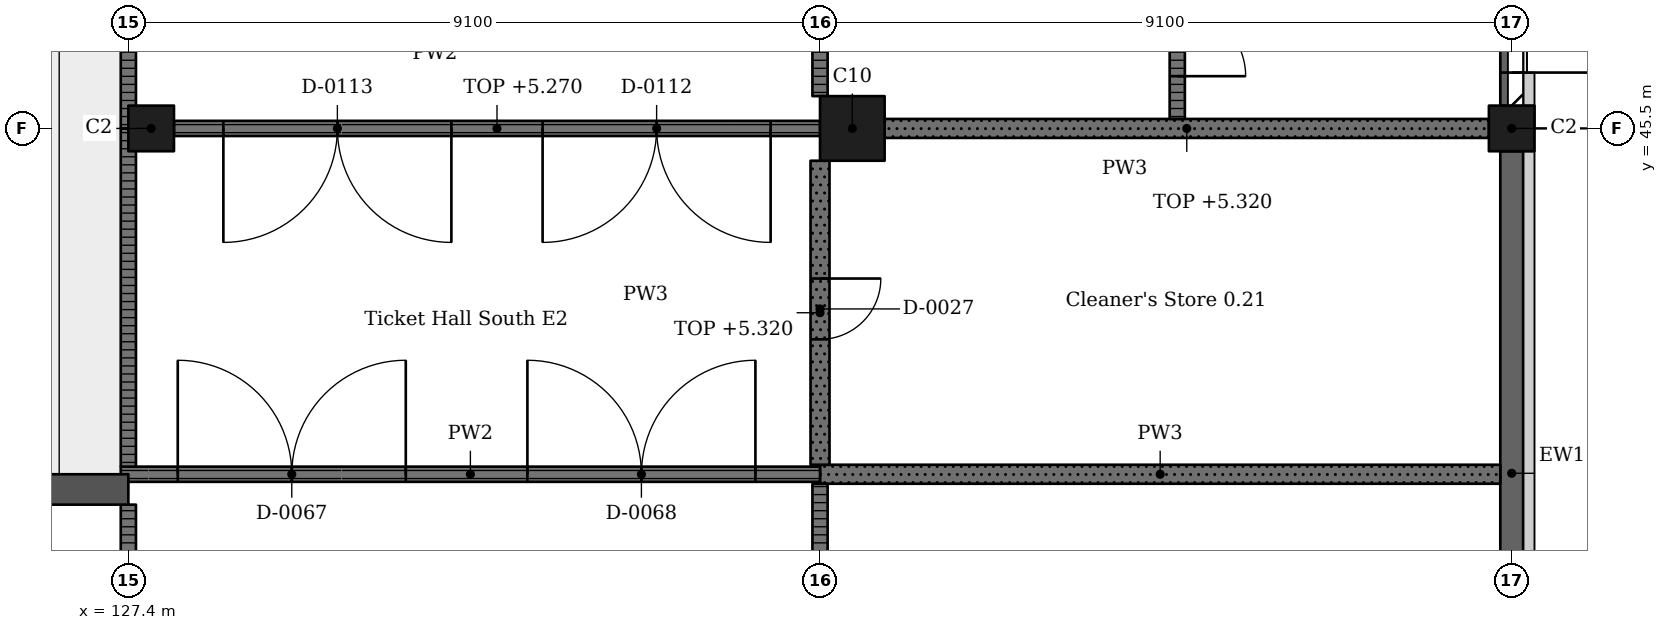
"""IFC4 building model, lengths in metres.
Left out: names, types, materials, properties, quantities, classifications, styles, units other than length and angle.
Written with IfcOpenShell. Run it as: python <this file> out.ifc"""

import sys

from ifc_helpers import new_model, si_unit, direction, frame, frame_2d, origin, origin_2d, place, context, subcontext, project, spatial, rectangle, extrude, element, fill, save


model = new_model("IFC4")
c1 = context("Model", 3, precision=1e-05, world=origin(), true_north=direction((0.0, 1.0)))
c2 = subcontext(c1, "Body", "Model", "MODEL_VIEW")
j1 = project(units=[si_unit("LENGTHUNIT", "METRE"), si_unit("PLANEANGLEUNIT", "RADIAN")], contexts=[c1])
p1 = place(None, origin())
s1 = spatial("IfcSite", under=j1, at=p1, CompositionType="ELEMENT")
p2 = place(p1, origin())
s2 = spatial("IfcBuilding", under=s1, at=p2, CompositionType="ELEMENT")
p3 = place(p2, origin())
s3 = spatial("IfcBuildingStorey", under=s2, at=p3, CompositionType="ELEMENT", Elevation=0.0)
p4 = place(p3, frame((127.7, 45.5, -0.4), z_axis=(0.0, 0.0, 1.0), x_axis=(1.0, 0.0, 0.0)))
e1 = element("IfcColumn", 1, at=p4, inside=s3, PredefinedType="COLUMN", context=c2, shape_type="SweptSolid", body=[
    extrude(rectangle(XDim=0.6, YDim=0.6, at=origin_2d()), origin(), (0.0, 0.0, 1.0), 6.77),
])
p5 = place(p3, frame((136.925, 45.5, -0.4), z_axis=(0.0, 0.0, 1.0), x_axis=(1.0, 0.0, 0.0)))
e2 = element("IfcColumn", 2, at=p5, inside=s3, PredefinedType="COLUMN", context=c2, shape_type="SweptSolid", body=[
    extrude(rectangle(XDim=0.85, YDim=0.85, at=origin_2d()), origin(), (0.0, 0.0, 1.0), 6.77),
])
p6 = place(p3, frame((145.6, 45.5, -0.4), z_axis=(0.0, 0.0, 1.0), x_axis=(1.0, 0.0, 0.0)))
e3 = element("IfcColumn", 3, at=p6, inside=s3, PredefinedType="COLUMN", context=c2, shape_type="SweptSolid", body=[
    extrude(rectangle(XDim=0.6, YDim=0.6, at=origin_2d()), origin(), (0.0, 0.0, 1.0), 6.77),
])
p7 = place(p3, frame((109.2, 40.75, -0.4), z_axis=(0.0, 0.0, 1.0), x_axis=(1.0, 0.0, 0.0)))
e4 = element("IfcWall", 4, at=p7, inside=s3, PredefinedType="SHEAR", context=c2, shape_type="SweptSolid", body=[
    extrude(rectangle(XDim=18.2, YDim=0.4, at=frame_2d((9.1, 0.0))), origin(), (0.0, 0.0, 1.0), 6.77),
])
p8 = place(p3, frame((145.6, 36.725, 0.0), z_axis=(0.0, 0.0, 1.0), x_axis=(0.0, 1.0, 0.0)))
e5 = element("IfcWall", 5, at=p8, inside=s3, PredefinedType="SOLIDWALL", context=c2, shape_type="SweptSolid", body=[
    extrude(rectangle(XDim=8.475, YDim=0.3, at=frame_2d((4.237, 0.0))), origin(), (0.0, 0.0, 1.0), 5.27),
])
p9 = place(p3, frame((145.6, 45.8, 0.0), z_axis=(0.0, 0.0, 1.0), x_axis=(0.0, 1.0, 0.0)))
e6 = element("IfcWall", 6, at=p9, inside=s3, PredefinedType="SOLIDWALL", context=c2, shape_type="SweptSolid", body=[
    extrude(rectangle(XDim=8.5, YDim=0.3, at=frame_2d((4.25, 0.0))), origin(), (0.0, 0.0, 1.0), 3.75),
])
p10 = place(p9, frame((0.435, 0.0, 0.0)))
e7 = element("IfcOpeningElement", 7, at=p10, cuts=e6, PredefinedType="OPENING", context=c2, shape_type="SweptSolid", body=[
    extrude(rectangle(XDim=3.6, YDim=2.7, at=frame_2d((1.8, 1.35))), frame((0.0, 0.16, 0.0), z_axis=(0.0, -1.0, 0.0), x_axis=(1.0, 0.0, 0.0)), (0.0, 0.0, 1.0), 0.32),
])
p11 = place(p9, frame((4.465, 0.0, 0.0)))
e8 = element("IfcOpeningElement", 8, at=p11, cuts=e6, PredefinedType="OPENING", context=c2, shape_type="SweptSolid", body=[
    extrude(rectangle(XDim=3.6, YDim=2.7, at=frame_2d((1.8, 1.35))), frame((0.0, 0.16, 0.0), z_axis=(0.0, -1.0, 0.0), x_axis=(1.0, 0.0, 0.0)), (0.0, 0.0, 1.0), 0.32),
])
p12 = place(p3, frame((127.3, 40.95, 0.0), z_axis=(0.0, 0.0, 1.0), x_axis=(1.0, 0.0, 0.0)))
e9 = element("IfcWall", 9, at=p12, inside=s3, PredefinedType="PARTITIONING", context=c2, shape_type="SweptSolid", body=[
    extrude(rectangle(XDim=9.2, YDim=0.2, at=frame_2d((4.6, 0.0))), origin(), (0.0, 0.0, 1.0), 6.02),
])
p13 = place(p12, frame((0.75, 0.0, 0.0)))
e10 = element("IfcOpeningElement", 10, at=p13, cuts=e9, PredefinedType="OPENING", context=c2, shape_type="SweptSolid", body=[
    extrude(rectangle(XDim=3.0, YDim=2.4, at=frame_2d((1.5, 1.2))), frame((0.0, 0.11, 0.0), z_axis=(0.0, -1.0, 0.0), x_axis=(1.0, 0.0, 0.0)), (0.0, 0.0, 1.0), 0.22),
])
p14 = place(p12, frame((5.35, 0.0, 0.0)))
e11 = element("IfcOpeningElement", 11, at=p14, cuts=e9, PredefinedType="OPENING", context=c2, shape_type="SweptSolid", body=[
    extrude(rectangle(XDim=3.0, YDim=2.4, at=frame_2d((1.5, 1.2))), frame((0.0, 0.11, 0.0), z_axis=(0.0, -1.0, 0.0), x_axis=(1.0, 0.0, 0.0)), (0.0, 0.0, 1.0), 0.22),
])
p15 = place(p3, frame((127.4, 40.55, 0.0), z_axis=(0.0, 0.0, 1.0), x_axis=(0.0, -1.0, 0.0)))
e12 = element("IfcWall", 12, at=p15, inside=s3, PredefinedType="PARTITIONING", context=c2, shape_type="SweptSolid", body=[
    extrude(rectangle(XDim=3.675, YDim=0.2, at=frame_2d((1.837, 0.0))), origin(), (0.0, 0.0, 1.0), 5.02),
])
p16 = place(p3, frame((127.4, 41.05, 0.0), z_axis=(0.0, 0.0, 1.0), x_axis=(0.0, 1.0, 0.0)))
e13 = element("IfcWall", 13, at=p16, inside=s3, PredefinedType="PARTITIONING", context=c2, shape_type="SweptSolid", body=[
    extrude(rectangle(XDim=4.45, YDim=0.2, at=frame_2d((2.225, 0.0))), origin(), (0.0, 0.0, 1.0), 5.02),
])
p17 = place(p3, frame((127.4, 45.5, 0.0), z_axis=(0.0, 0.0, 1.0), x_axis=(0.0, 1.0, 0.0)))
e14 = element("IfcWall", 14, at=p17, inside=s3, PredefinedType="PARTITIONING", context=c2, shape_type="SweptSolid", body=[
    extrude(rectangle(XDim=8.8, YDim=0.2, at=frame_2d((4.4, 0.0))), origin(), (0.0, 0.0, 1.0), 5.02),
])
p18 = place(p3, frame((136.5, 36.85, 0.0), z_axis=(0.0, 0.0, 1.0), x_axis=(0.0, 1.0, 0.0)))
e15 = element("IfcWall", 15, at=p18, inside=s3, PredefinedType="PARTITIONING", context=c2, shape_type="SweptSolid", body=[
    extrude(rectangle(XDim=3.975, YDim=0.2, at=frame_2d((1.987, 0.0))), origin(), (0.0, 0.0, 1.0), 5.32),
])
p19 = place(p3, frame((136.5, 40.95, 0.0), z_axis=(0.0, 0.0, 1.0), x_axis=(1.0, 0.0, 0.0)))
e16 = element("IfcWall", 16, at=p19, inside=s3, PredefinedType="SOLIDWALL", context=c2, shape_type="SweptSolid", body=[
    extrude(rectangle(XDim=8.95, YDim=0.25, at=frame_2d((4.475, 0.0))), origin(), (0.0, 0.0, 1.0), 6.02),
])
p20 = place(p3, frame((136.5, 45.075, 0.0), z_axis=(0.0, 0.0, 1.0), x_axis=(0.0, -1.0, 0.0)))
e17 = element("IfcWall", 17, at=p20, inside=s3, PredefinedType="SOLIDWALL", context=c2, shape_type="SweptSolid", body=[
    extrude(rectangle(XDim=4.0, YDim=0.25, at=frame_2d((2.0, 0.0))), origin(), (0.0, 0.0, 1.0), 5.32),
])
p21 = place(p20, frame((1.55, 0.0, 0.0)))
e18 = element("IfcOpeningElement", 18, at=p21, cuts=e17, PredefinedType="OPENING", context=c2, shape_type="SweptSolid", body=[
    extrude(rectangle(XDim=0.8, YDim=2.1, at=frame_2d((0.4, 1.05))), frame((0.0, 0.135, 0.0), z_axis=(0.0, -1.0, 0.0), x_axis=(1.0, 0.0, 0.0)), (0.0, 0.0, 1.0), 0.27),
])
p22 = place(p3, frame((136.5, 45.5, 0.0), z_axis=(0.0, 0.0, 1.0), x_axis=(-1.0, 0.0, 0.0)))
e19 = element("IfcWall", 19, at=p22, inside=s3, PredefinedType="PARTITIONING", context=c2, shape_type="SweptSolid", body=[
    extrude(rectangle(XDim=8.5, YDim=0.2, at=frame_2d((4.25, 0.0))), origin(), (0.0, 0.0, 1.0), 5.27),
])
p23 = place(p22, frame((0.65, 0.0, 0.0)))
e20 = element("IfcOpeningElement", 20, at=p23, cuts=e19, PredefinedType="OPENING", context=c2, shape_type="SweptSolid", body=[
    extrude(rectangle(XDim=3.0, YDim=2.4, at=frame_2d((1.5, 1.2))), frame((0.0, 0.11, 0.0), z_axis=(0.0, -1.0, 0.0), x_axis=(1.0, 0.0, 0.0)), (0.0, 0.0, 1.0), 0.22),
])
p24 = place(p22, frame((4.85, 0.0, 0.0)))
e21 = element("IfcOpeningElement", 21, at=p24, cuts=e19, PredefinedType="OPENING", context=c2, shape_type="SweptSolid", body=[
    extrude(rectangle(XDim=3.0, YDim=2.4, at=frame_2d((1.5, 1.2))), frame((0.0, 0.11, 0.0), z_axis=(0.0, -1.0, 0.0), x_axis=(1.0, 0.0, 0.0)), (0.0, 0.0, 1.0), 0.22),
])
p25 = place(p3, frame((136.5, 54.175, 0.0), z_axis=(0.0, 0.0, 1.0), x_axis=(0.0, -1.0, 0.0)))
e22 = element("IfcWall", 22, at=p25, inside=s3, PredefinedType="PARTITIONING", context=c2, shape_type="SweptSolid", body=[
    extrude(rectangle(XDim=8.25, YDim=0.2, at=frame_2d((4.125, 0.0))), origin(), (0.0, 0.0, 1.0), 5.32),
])
p26 = place(p25, frame((1.15, 0.0, 0.0)))
e23 = element("IfcOpeningElement", 23, at=p26, cuts=e22, PredefinedType="OPENING", context=c2, shape_type="SweptSolid", body=[
    extrude(rectangle(XDim=1.8, YDim=2.4, at=frame_2d((0.9, 1.2))), frame((0.0, 0.11, 0.0), z_axis=(0.0, -1.0, 0.0), x_axis=(1.0, 0.0, 0.0)), (0.0, 0.0, 1.0), 0.22),
])
p27 = place(p25, frame((5.25, 0.0, 0.0)))
e24 = element("IfcOpeningElement", 24, at=p27, cuts=e22, PredefinedType="OPENING", context=c2, shape_type="SweptSolid", body=[
    extrude(rectangle(XDim=1.8, YDim=2.4, at=frame_2d((0.9, 1.2))), frame((0.0, 0.11, 0.0), z_axis=(0.0, -1.0, 0.0), x_axis=(1.0, 0.0, 0.0)), (0.0, 0.0, 1.0), 0.22),
])
p28 = place(p25, frame((3.45, 0.0, 0.0)))
e25 = element("IfcOpeningElement", 25, at=p28, cuts=e22, PredefinedType="OPENING", context=c2, shape_type="SweptSolid", body=[
    extrude(rectangle(XDim=1.8, YDim=2.4, at=frame_2d((0.9, 1.2))), frame((0.0, 0.11, 0.0), z_axis=(0.0, -1.0, 0.0), x_axis=(1.0, 0.0, 0.0)), (0.0, 0.0, 1.0), 0.22),
])
p29 = place(p3, frame((137.35, 45.5, 0.0), z_axis=(0.0, 0.0, 1.0), x_axis=(1.0, 0.0, 0.0)))
e26 = element("IfcWall", 26, at=p29, inside=s3, PredefinedType="SOLIDWALL", context=c2, shape_type="SweptSolid", body=[
    extrude(rectangle(XDim=7.95, YDim=0.25, at=frame_2d((3.975, 0.0))), origin(), (0.0, 0.0, 1.0), 5.32),
])
p30 = place(p3, frame((141.2, 63.637, 0.0), z_axis=(0.0, 0.0, 1.0), x_axis=(0.0, -1.0, 0.0)))
e27 = element("IfcWall", 27, at=p30, inside=s3, PredefinedType="PARTITIONING", context=c2, shape_type="SweptSolid", body=[
    extrude(rectangle(XDim=18.012, YDim=0.2, at=frame_2d((9.006, 0.0))), origin(), (0.0, 0.0, 1.0), 6.02),
])
p31 = place(p30, frame((0.65, 0.0, 0.0)))
e28 = element("IfcOpeningElement", 28, at=p31, cuts=e27, PredefinedType="OPENING", context=c2, shape_type="SweptSolid", body=[
    extrude(rectangle(XDim=1.8, YDim=2.4, at=frame_2d((0.9, 1.2))), frame((0.0, 0.11, 0.0), z_axis=(0.0, -1.0, 0.0), x_axis=(1.0, 0.0, 0.0)), (0.0, 0.0, 1.0), 0.22),
])
p32 = place(p30, frame((3.65, 0.0, 0.0)))
e29 = element("IfcOpeningElement", 29, at=p32, cuts=e27, PredefinedType="OPENING", context=c2, shape_type="SweptSolid", body=[
    extrude(rectangle(XDim=1.8, YDim=2.4, at=frame_2d((0.9, 1.2))), frame((0.0, 0.11, 0.0), z_axis=(0.0, -1.0, 0.0), x_axis=(1.0, 0.0, 0.0)), (0.0, 0.0, 1.0), 0.22),
])
p33 = place(p30, frame((6.65, 0.0, 0.0)))
e30 = element("IfcOpeningElement", 30, at=p33, cuts=e27, PredefinedType="OPENING", context=c2, shape_type="SweptSolid", body=[
    extrude(rectangle(XDim=1.8, YDim=2.4, at=frame_2d((0.9, 1.2))), frame((0.0, 0.11, 0.0), z_axis=(0.0, -1.0, 0.0), x_axis=(1.0, 0.0, 0.0)), (0.0, 0.0, 1.0), 0.22),
])
p34 = place(p30, frame((9.65, 0.0, 0.0)))
e31 = element("IfcOpeningElement", 31, at=p34, cuts=e27, PredefinedType="OPENING", context=c2, shape_type="SweptSolid", body=[
    extrude(rectangle(XDim=1.8, YDim=2.4, at=frame_2d((0.9, 1.2))), frame((0.0, 0.11, 0.0), z_axis=(0.0, -1.0, 0.0), x_axis=(1.0, 0.0, 0.0)), (0.0, 0.0, 1.0), 0.22),
])
p35 = place(p30, frame((12.65, 0.0, 0.0)))
e32 = element("IfcOpeningElement", 32, at=p35, cuts=e27, PredefinedType="OPENING", context=c2, shape_type="SweptSolid", body=[
    extrude(rectangle(XDim=1.8, YDim=2.4, at=frame_2d((0.9, 1.2))), frame((0.0, 0.11, 0.0), z_axis=(0.0, -1.0, 0.0), x_axis=(1.0, 0.0, 0.0)), (0.0, 0.0, 1.0), 0.22),
])
p36 = place(p30, frame((15.65, 0.0, 0.0)))
e33 = element("IfcOpeningElement", 33, at=p36, cuts=e27, PredefinedType="OPENING", context=c2, shape_type="SweptSolid", body=[
    extrude(rectangle(XDim=1.8, YDim=2.4, at=frame_2d((0.9, 1.2))), frame((0.0, 0.11, 0.0), z_axis=(0.0, -1.0, 0.0), x_axis=(1.0, 0.0, 0.0)), (0.0, 0.0, 1.0), 0.22),
])
p37 = place(p10, frame((3.6, 0.0, 0.0), z_axis=(0.0, 0.0, 1.0), x_axis=(-1.0, 0.0, 0.0)))
e34 = element("IfcDoor", 34, at=p37, inside=s3, OperationType="DOUBLE_DOOR_SINGLE_SWING", PredefinedType="DOOR", context=c2, shape_type="SweptSolid", body=[
    extrude(rectangle(XDim=3.6, YDim=2.7, at=frame_2d((1.8, 1.35))), frame((0.0, 0.025, 0.0), z_axis=(0.0, -1.0, 0.0), x_axis=(1.0, 0.0, 0.0)), (0.0, 0.0, 1.0), 0.05),
])
fill(e7, e34)
p38 = place(p21, origin())
e35 = element("IfcDoor", 35, at=p38, inside=s3, OperationType="SINGLE_SWING_RIGHT", PredefinedType="DOOR", context=c2, shape_type="SweptSolid", body=[
    extrude(rectangle(XDim=0.8, YDim=2.1, at=frame_2d((0.4, 1.05))), frame((0.0, 0.025, 0.0), z_axis=(0.0, -1.0, 0.0), x_axis=(1.0, 0.0, 0.0)), (0.0, 0.0, 1.0), 0.05),
])
fill(e18, e35)
p39 = place(p13, origin())
e36 = element("IfcDoor", 36, at=p39, inside=s3, OperationType="DOUBLE_DOOR_SINGLE_SWING", PredefinedType="DOOR", context=c2, shape_type="SweptSolid", body=[
    extrude(rectangle(XDim=3.0, YDim=2.4, at=frame_2d((1.5, 1.2))), frame((0.0, 0.025, 0.0), z_axis=(0.0, -1.0, 0.0), x_axis=(1.0, 0.0, 0.0)), (0.0, 0.0, 1.0), 0.05),
])
fill(e10, e36)
p40 = place(p14, origin())
e37 = element("IfcDoor", 37, at=p40, inside=s3, OperationType="DOUBLE_DOOR_SINGLE_SWING", PredefinedType="DOOR", context=c2, shape_type="SweptSolid", body=[
    extrude(rectangle(XDim=3.0, YDim=2.4, at=frame_2d((1.5, 1.2))), frame((0.0, 0.025, 0.0), z_axis=(0.0, -1.0, 0.0), x_axis=(1.0, 0.0, 0.0)), (0.0, 0.0, 1.0), 0.05),
])
fill(e11, e37)
p41 = place(p23, origin())
e38 = element("IfcDoor", 38, at=p41, inside=s3, OperationType="DOUBLE_DOOR_SINGLE_SWING", PredefinedType="DOOR", context=c2, shape_type="SweptSolid", body=[
    extrude(rectangle(XDim=3.0, YDim=2.4, at=frame_2d((1.5, 1.2))), frame((0.0, 0.025, 0.0), z_axis=(0.0, -1.0, 0.0), x_axis=(1.0, 0.0, 0.0)), (0.0, 0.0, 1.0), 0.05),
])
fill(e20, e38)
p42 = place(p24, origin())
e39 = element("IfcDoor", 39, at=p42, inside=s3, OperationType="DOUBLE_DOOR_SINGLE_SWING", PredefinedType="DOOR", context=c2, shape_type="SweptSolid", body=[
    extrude(rectangle(XDim=3.0, YDim=2.4, at=frame_2d((1.5, 1.2))), frame((0.0, 0.025, 0.0), z_axis=(0.0, -1.0, 0.0), x_axis=(1.0, 0.0, 0.0)), (0.0, 0.0, 1.0), 0.05),
])
fill(e21, e39)
p43 = place(p36, origin())
e40 = element("IfcDoor", 40, at=p43, inside=s3, OperationType="DOUBLE_DOOR_SINGLE_SWING", PredefinedType="DOOR", context=c2, shape_type="SweptSolid", body=[
    extrude(rectangle(XDim=1.8, YDim=2.4, at=frame_2d((0.9, 1.2))), frame((0.0, 0.025, 0.0), z_axis=(0.0, -1.0, 0.0), x_axis=(1.0, 0.0, 0.0)), (0.0, 0.0, 1.0), 0.05),
])
fill(e33, e40)
save(model, sys.argv[1])
